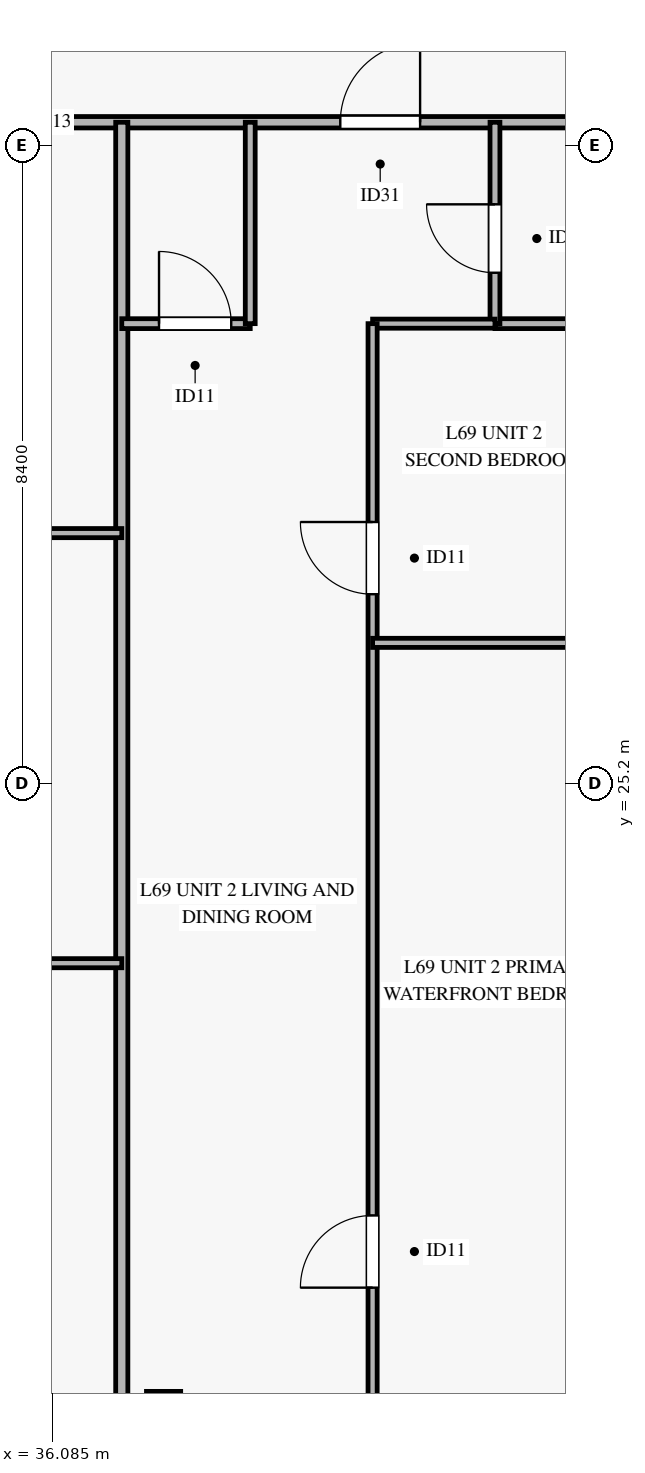
"""IFC4 building model, lengths in metres.
Left out: names, types, materials, properties, quantities, classifications, styles, units other than length and angle.
Written with IfcOpenShell. Run it as: python <this file> out.ifc"""

import sys

from ifc_helpers import new_model, si_unit, direction, frame, frame_2d, origin, origin_2d, place, context, subcontext, project, spatial, rectangle, hollow_rectangle, extrude, source, transform, mapped, element, fill, save


model = new_model("IFC4")
c1 = context("Model", 3, precision=1e-05, world=origin(), true_north=direction((0.0, 1.0)))
c2 = subcontext(c1, "Body", "Model", "MODEL_VIEW")
j1 = project(units=[si_unit("LENGTHUNIT", "METRE"), si_unit("PLANEANGLEUNIT", "RADIAN")], contexts=[c1])
p1 = place(None, origin())
s1 = spatial("IfcSite", under=j1, at=p1, CompositionType="ELEMENT")
p2 = place(p1, origin())
s2 = spatial("IfcBuilding", under=s1, at=p2, CompositionType="ELEMENT")
p3 = place(p2, frame((0.0, 0.0, 268.9)))
s3 = spatial("IfcBuildingStorey", under=s2, at=p3, CompositionType="ELEMENT", Elevation=268.9)
m1 = source(origin(), c2, "Body", "SweptSolid", [
    extrude(hollow_rectangle(XDim=0.45, YDim=0.45, WallThickness=0.022, at=origin_2d()), origin(), (0.0, 0.0, 1.0), 3.185),
])
p4 = place(p3, frame((37.55, 16.976, 0.0), z_axis=(0.0, 0.0, 1.0), x_axis=(1.0, 0.0, 0.0)))
e1 = element("IfcColumn", 1, at=p4, inside=s3, PredefinedType="COLUMN", context=c2, shape_type="MappedRepresentation", body=[
    mapped(m1, transform((0.0, 0.0, 0.0), x_axis=(1.0, 0.0, 0.0), y_axis=(0.0, 1.0, 0.0), z_axis=(0.0, 0.0, 1.0), scale=1.0)),
])
p5 = place(p3, frame((9.194, 33.9, 0.0), z_axis=(0.0, 0.0, 1.0), x_axis=(1.0, 0.0, 0.0)))
e2 = element("IfcWall", 2, at=p5, inside=s3, PredefinedType="PARTITIONING", context=c2, shape_type="SweptSolid", body=[
    extrude(rectangle(XDim=52.013, YDim=0.15, at=frame_2d((26.006, 0.0))), origin(), (0.0, 0.0, 1.0), 2.47),
])
p6 = place(p5, frame((5.729, 0.0, 0.0)))
e3 = element("IfcOpeningElement", 3, at=p6, cuts=e2, PredefinedType="OPENING", context=c2, shape_type="SweptSolid", body=[
    extrude(rectangle(XDim=1.05, YDim=2.15, at=frame_2d((0.525, 1.075))), frame((0.0, 0.085, 0.0), z_axis=(0.0, -1.0, 0.0), x_axis=(1.0, 0.0, 0.0)), (0.0, 0.0, 1.0), 0.17),
])
p7 = place(p5, frame((17.231, 0.0, 0.0)))
e4 = element("IfcOpeningElement", 4, at=p7, cuts=e2, PredefinedType="OPENING", context=c2, shape_type="SweptSolid", body=[
    extrude(rectangle(XDim=1.05, YDim=2.15, at=frame_2d((0.525, 1.075))), frame((0.0, 0.085, 0.0), z_axis=(0.0, -1.0, 0.0), x_axis=(1.0, 0.0, 0.0)), (0.0, 0.0, 1.0), 0.17),
])
p8 = place(p5, frame((23.759, 0.0, 0.0)))
e5 = element("IfcOpeningElement", 5, at=p8, cuts=e2, PredefinedType="OPENING", context=c2, shape_type="SweptSolid", body=[
    extrude(rectangle(XDim=1.05, YDim=2.15, at=frame_2d((0.525, 1.075))), frame((0.0, 0.085, 0.0), z_axis=(0.0, -1.0, 0.0), x_axis=(1.0, 0.0, 0.0)), (0.0, 0.0, 1.0), 0.17),
])
p9 = place(p5, frame((30.681, 0.0, 0.0)))
e6 = element("IfcOpeningElement", 6, at=p9, cuts=e2, PredefinedType="OPENING", context=c2, shape_type="SweptSolid", body=[
    extrude(rectangle(XDim=1.05, YDim=2.15, at=frame_2d((0.525, 1.075))), frame((0.0, 0.085, 0.0), z_axis=(0.0, -1.0, 0.0), x_axis=(1.0, 0.0, 0.0)), (0.0, 0.0, 1.0), 0.17),
])
p10 = place(p5, frame((36.826, 0.0, 0.0)))
e7 = element("IfcOpeningElement", 7, at=p10, cuts=e2, PredefinedType="OPENING", context=c2, shape_type="SweptSolid", body=[
    extrude(rectangle(XDim=1.05, YDim=2.15, at=frame_2d((0.525, 1.075))), frame((0.0, 0.085, 0.0), z_axis=(0.0, -1.0, 0.0), x_axis=(1.0, 0.0, 0.0)), (0.0, 0.0, 1.0), 0.17),
])
p11 = place(p5, frame((44.786, 0.0, 0.0)))
e8 = element("IfcOpeningElement", 8, at=p11, cuts=e2, PredefinedType="OPENING", context=c2, shape_type="SweptSolid", body=[
    extrude(rectangle(XDim=1.05, YDim=2.15, at=frame_2d((0.525, 1.075))), frame((0.0, 0.085, 0.0), z_axis=(0.0, -1.0, 0.0), x_axis=(1.0, 0.0, 0.0)), (0.0, 0.0, 1.0), 0.17),
])
p12 = place(p3, frame((37.0, 16.976, 0.0), z_axis=(0.0, 0.0, 1.0), x_axis=(0.0, 1.0, 0.0)))
e9 = element("IfcWall", 9, at=p12, inside=s3, PredefinedType="PARTITIONING", context=c2, shape_type="SweptSolid", body=[
    extrude(rectangle(XDim=16.924, YDim=0.16, at=frame_2d((8.462, 0.0))), origin(), (0.0, 0.0, 1.0), 2.77),
])
p13 = place(p3, frame((30.2, 22.835, 0.0), z_axis=(0.0, 0.0, 1.0), x_axis=(1.0, 0.0, 0.0)))
e10 = element("IfcWall", 10, at=p13, inside=s3, PredefinedType="PARTITIONING", context=c2, shape_type="SweptSolid", body=[
    extrude(rectangle(XDim=6.8, YDim=0.12, at=frame_2d((3.4, 0.0))), origin(), (0.0, 0.0, 1.0), 2.47),
])
p14 = place(p13, frame((2.886, 0.0, 0.0)))
e11 = element("IfcOpeningElement", 11, at=p14, cuts=e10, PredefinedType="OPENING", context=c2, shape_type="SweptSolid", body=[
    extrude(rectangle(XDim=0.95, YDim=2.1, at=frame_2d((0.475, 1.05))), frame((0.0, 0.07, 0.0), z_axis=(0.0, -1.0, 0.0), x_axis=(1.0, 0.0, 0.0)), (0.0, 0.0, 1.0), 0.14),
])
p15 = place(p3, frame((30.2, 28.494, 0.0), z_axis=(0.0, 0.0, 1.0), x_axis=(1.0, 0.0, 0.0)))
e12 = element("IfcWall", 12, at=p15, inside=s3, PredefinedType="PARTITIONING", context=c2, shape_type="SweptSolid", body=[
    extrude(rectangle(XDim=6.8, YDim=0.12, at=frame_2d((3.4, 0.0))), origin(), (0.0, 0.0, 1.0), 2.47),
])
p16 = place(p15, frame((2.886, 0.0, 0.0)))
e13 = element("IfcOpeningElement", 13, at=p16, cuts=e12, PredefinedType="OPENING", context=c2, shape_type="SweptSolid", body=[
    extrude(rectangle(XDim=0.95, YDim=2.1, at=frame_2d((0.475, 1.05))), frame((0.0, 0.07, 0.0), z_axis=(0.0, -1.0, 0.0), x_axis=(1.0, 0.0, 0.0)), (0.0, 0.0, 1.0), 0.14),
])
p17 = place(p3, frame((37.0, 31.25, 0.0), z_axis=(0.0, 0.0, 1.0), x_axis=(1.0, 0.0, 0.0)))
e14 = element("IfcWall", 14, at=p17, inside=s3, PredefinedType="PARTITIONING", context=c2, shape_type="SweptSolid", body=[
    extrude(rectangle(XDim=1.69, YDim=0.13, at=frame_2d((0.845, 0.0))), origin(), (0.0, 0.0, 1.0), 2.47),
])
p18 = place(p17, frame((0.49, 0.0, 0.0)))
e15 = element("IfcOpeningElement", 15, at=p18, cuts=e14, PredefinedType="OPENING", context=c2, shape_type="SweptSolid", body=[
    extrude(rectangle(XDim=0.95, YDim=2.1, at=frame_2d((0.475, 1.05))), frame((0.0, 0.075, 0.0), z_axis=(0.0, -1.0, 0.0), x_axis=(1.0, 0.0, 0.0)), (0.0, 0.0, 1.0), 0.15),
])
p19 = place(p3, frame((38.69, 31.25, 0.0), z_axis=(0.0, 0.0, 1.0), x_axis=(0.0, 1.0, 0.0)))
e16 = element("IfcWall", 16, at=p19, inside=s3, PredefinedType="PARTITIONING", context=c2, shape_type="SweptSolid", body=[
    extrude(rectangle(XDim=2.65, YDim=0.13, at=frame_2d((1.325, 0.0))), origin(), (0.0, 0.0, 1.0), 2.77),
])
p20 = place(p3, frame((41.91, 31.25, 0.0), z_axis=(0.0, 0.0, 1.0), x_axis=(1.0, 0.0, 0.0)))
e17 = element("IfcWall", 17, at=p20, inside=s3, PredefinedType="PARTITIONING", context=c2, shape_type="SweptSolid", body=[
    extrude(rectangle(XDim=1.69, YDim=0.13, at=frame_2d((0.845, 0.0))), origin(), (0.0, 0.0, 1.0), 3.185),
])
p21 = place(p3, frame((41.91, 31.25, 0.0), z_axis=(0.0, 0.0, 1.0), x_axis=(0.0, 1.0, 0.0)))
e18 = element("IfcWall", 18, at=p21, inside=s3, PredefinedType="PARTITIONING", context=c2, shape_type="SweptSolid", body=[
    extrude(rectangle(XDim=2.65, YDim=0.13, at=frame_2d((1.325, 0.0))), origin(), (0.0, 0.0, 1.0), 2.77),
])
p22 = place(p21, frame((0.67, 0.0, 0.0)))
e19 = element("IfcOpeningElement", 19, at=p22, cuts=e18, PredefinedType="OPENING", context=c2, shape_type="SweptSolid", body=[
    extrude(rectangle(XDim=0.9, YDim=2.1, at=frame_2d((0.45, 1.05))), frame((0.0, 0.075, 0.0), z_axis=(0.0, -1.0, 0.0), x_axis=(1.0, 0.0, 0.0)), (0.0, 0.0, 1.0), 0.15),
])
p23 = place(p3, frame((40.3, 31.25, 0.0), z_axis=(0.0, 0.0, 1.0), x_axis=(1.0, 0.0, 0.0)))
e20 = element("IfcWall", 20, at=p23, inside=s3, PredefinedType="PARTITIONING", context=c2, shape_type="SweptSolid", body=[
    extrude(rectangle(XDim=1.61, YDim=0.12, at=frame_2d((0.805, 0.0))), origin(), (0.0, 0.0, 1.0), 3.185),
])
p24 = place(p3, frame((40.3, 16.976, 0.0), z_axis=(0.0, 0.0, 1.0), x_axis=(0.0, 1.0, 0.0)))
e21 = element("IfcWall", 21, at=p24, inside=s3, PredefinedType="PARTITIONING", context=c2, shape_type="SweptSolid", body=[
    extrude(rectangle(XDim=14.274, YDim=0.12, at=frame_2d((7.137, 0.0))), origin(), (0.0, 0.0, 1.0), 2.77),
])
p25 = place(p24, frame((1.59, 0.0, 0.0)))
e22 = element("IfcOpeningElement", 22, at=p25, cuts=e21, PredefinedType="OPENING", context=c2, shape_type="SweptSolid", body=[
    extrude(rectangle(XDim=0.95, YDim=2.1, at=frame_2d((0.475, 1.05))), frame((0.0, 0.07, 0.0), z_axis=(0.0, -1.0, 0.0), x_axis=(1.0, 0.0, 0.0)), (0.0, 0.0, 1.0), 0.14),
])
p26 = place(p24, frame((10.714, 0.0, 0.0)))
e23 = element("IfcOpeningElement", 23, at=p26, cuts=e21, PredefinedType="OPENING", context=c2, shape_type="SweptSolid", body=[
    extrude(rectangle(XDim=0.95, YDim=2.1, at=frame_2d((0.475, 1.05))), frame((0.0, 0.07, 0.0), z_axis=(0.0, -1.0, 0.0), x_axis=(1.0, 0.0, 0.0)), (0.0, 0.0, 1.0), 0.14),
])
p27 = place(p3, frame((40.3, 27.05, 0.0), z_axis=(0.0, 0.0, 1.0), x_axis=(1.0, 0.0, 0.0)))
e24 = element("IfcWall", 24, at=p27, inside=s3, PredefinedType="PARTITIONING", context=c2, shape_type="SweptSolid", body=[
    extrude(rectangle(XDim=3.3, YDim=0.12, at=frame_2d((1.65, 0.0))), origin(), (0.0, 0.0, 1.0), 2.77),
])
m2 = source(origin(), c2, "Body", "SweptSolid", [
    extrude(rectangle(XDim=1.05, YDim=2.15, at=frame_2d((0.525, 1.075))), frame((0.0, 0.025, 0.0), z_axis=(0.0, -1.0, 0.0), x_axis=(1.0, 0.0, 0.0)), (0.0, 0.0, 1.0), 0.05),
])
p28 = place(p9, origin())
e25 = element("IfcDoor", 25, at=p28, inside=s3, OperationType="SINGLE_SWING_RIGHT", PredefinedType="DOOR", context=c2, shape_type="MappedRepresentation", body=[
    mapped(m2, transform((0.0, 0.0, 0.0), x_axis=(1.0, 0.0, 0.0), y_axis=(0.0, 1.0, 0.0), z_axis=(0.0, 0.0, 1.0), scale=1.0)),
])
fill(e6, e25)
m3 = source(origin(), c2, "Body", "SweptSolid", [
    extrude(rectangle(XDim=0.95, YDim=2.1, at=frame_2d((0.475, 1.05))), frame((0.0, 0.025, 0.0), z_axis=(0.0, -1.0, 0.0), x_axis=(1.0, 0.0, 0.0)), (0.0, 0.0, 1.0), 0.05),
])
p29 = place(p18, origin())
e26 = element("IfcDoor", 26, at=p29, inside=s3, OperationType="SINGLE_SWING_LEFT", PredefinedType="DOOR", context=c2, shape_type="MappedRepresentation", body=[
    mapped(m3, transform((0.0, 0.0, 0.0), x_axis=(1.0, 0.0, 0.0), y_axis=(0.0, 1.0, 0.0), z_axis=(0.0, 0.0, 1.0), scale=1.0)),
])
fill(e15, e26)
m4 = source(origin(), c2, "Body", "SweptSolid", [
    extrude(rectangle(XDim=0.9, YDim=2.1, at=frame_2d((0.45, 1.05))), frame((0.0, 0.025, 0.0), z_axis=(0.0, -1.0, 0.0), x_axis=(1.0, 0.0, 0.0)), (0.0, 0.0, 1.0), 0.05),
])
p30 = place(p22, origin())
e27 = element("IfcDoor", 27, at=p30, inside=s3, OperationType="SINGLE_SWING_RIGHT", PredefinedType="DOOR", context=c2, shape_type="MappedRepresentation", body=[
    mapped(m4, transform((0.0, 0.0, 0.0), x_axis=(1.0, 0.0, 0.0), y_axis=(0.0, 1.0, 0.0), z_axis=(0.0, 0.0, 1.0), scale=1.0)),
])
fill(e19, e27)
p31 = place(p25, origin())
e28 = element("IfcDoor", 28, at=p31, inside=s3, OperationType="SINGLE_SWING_LEFT", PredefinedType="DOOR", context=c2, shape_type="MappedRepresentation", body=[
    mapped(m3, transform((0.0, 0.0, 0.0), x_axis=(1.0, 0.0, 0.0), y_axis=(0.0, 1.0, 0.0), z_axis=(0.0, 0.0, 1.0), scale=1.0)),
])
fill(e22, e28)
p32 = place(p26, origin())
e29 = element("IfcDoor", 29, at=p32, inside=s3, OperationType="SINGLE_SWING_RIGHT", PredefinedType="DOOR", context=c2, shape_type="MappedRepresentation", body=[
    mapped(m3, transform((0.0, 0.0, 0.0), x_axis=(1.0, 0.0, 0.0), y_axis=(0.0, 1.0, 0.0), z_axis=(0.0, 0.0, 1.0), scale=1.0)),
])
fill(e23, e29)
save(model, sys.argv[1])
